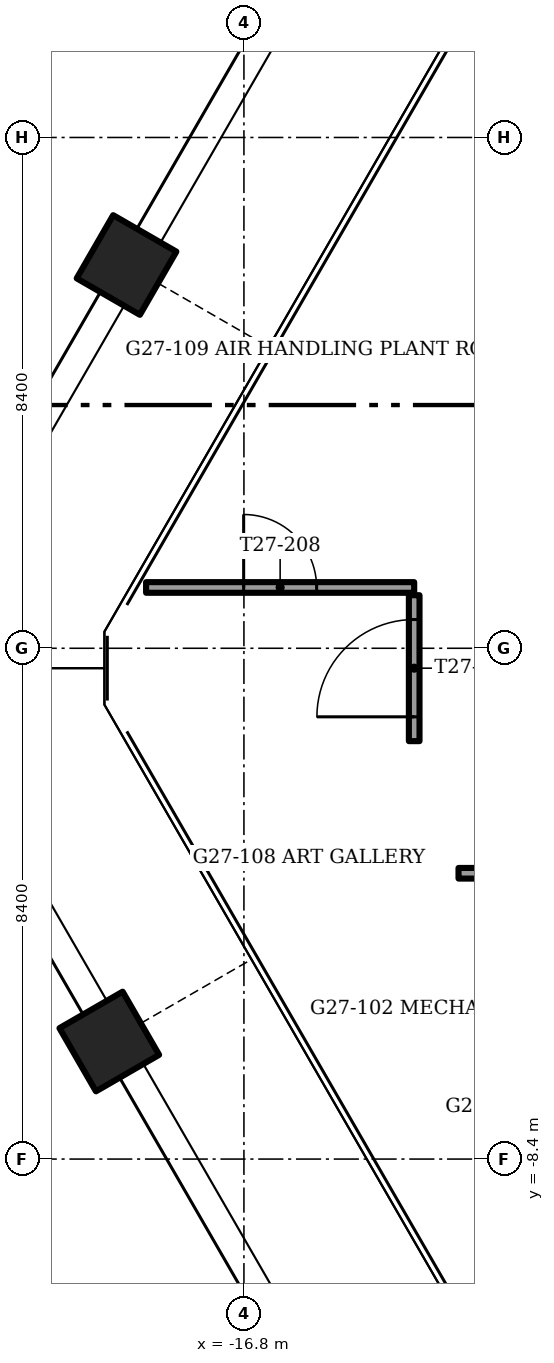
"""IFC4 building model, lengths in metres.
Left out: names, types, materials, properties, quantities, classifications, styles, units other than length and angle.
Written with IfcOpenShell. Run it as: python <this file> out.ifc"""

import sys

from ifc_helpers import new_model, si_unit, direction, frame, frame_2d, origin, origin_2d, place, context, subcontext, project, spatial, rectangle, extrude, element, fill, save


model = new_model("IFC4")
c1 = context("Model", 3, precision=1e-05, world=origin(), true_north=direction((0.0, 1.0)))
c2 = subcontext(c1, "Body", "Model", "MODEL_VIEW")
j1 = project(units=[si_unit("LENGTHUNIT", "METRE"), si_unit("PLANEANGLEUNIT", "RADIAN")], contexts=[c1])
p1 = place(None, origin())
s1 = spatial("IfcSite", under=j1, at=p1, CompositionType="ELEMENT")
p2 = place(p1, origin())
s2 = spatial("IfcBuilding", under=s1, at=p2, CompositionType="ELEMENT")
p3 = place(p2, frame((0.0, 0.0, 108.0)))
s3 = spatial("IfcBuildingStorey", under=s2, at=p3, CompositionType="ELEMENT", Elevation=108.0)
for number, where, z_axis, x_axis in (
    (1, (-18.731, 6.303, -1.2), (0.0, 0.0, 1.0), (0.5, 0.866, 0.0)),
    (2, (-19.014, -6.467, -1.2), (0.0, 0.0, 1.0), (-0.5, 0.866, 0.0)),
):
    element("IfcColumn", number, at=place(p3, frame(where, z_axis=z_axis, x_axis=x_axis)), inside=s3, PredefinedType="COLUMN", context=c2, shape_type="SweptSolid", body=[
        extrude(rectangle(XDim=1.2, YDim=1.2, at=origin_2d()), origin(), (0.0, 0.0, 1.0), 8.0),
    ])
p4 = place(p3, frame((-13.271, -3.7, 0.0), z_axis=(0.0, 0.0, 1.0), x_axis=(1.0, 0.0, 0.0)))
e3 = element("IfcWall", 3, at=p4, inside=s3, PredefinedType="PARTITIONING", context=c2, shape_type="SweptSolid", body=[
    extrude(rectangle(XDim=3.891, YDim=0.175, at=frame_2d((1.946, 0.0))), origin(), (0.0, 0.0, 1.0), 7.7),
])
p5 = place(p4, frame((1.346, 0.0, 0.0)))
e4 = element("IfcOpeningElement", 4, at=p5, cuts=e3, PredefinedType="OPENING", context=c2, shape_type="SweptSolid", body=[
    extrude(rectangle(XDim=1.2, YDim=2.1, at=frame_2d((0.6, 1.05))), frame((0.0, 0.087, 0.0), z_axis=(0.0, -1.0, 0.0), x_axis=(1.0, 0.0, 0.0)), (0.0, 0.0, 1.0), 0.175),
])
p6 = place(p3, frame((-18.409, 1.0, 0.0), z_axis=(0.0, 0.0, 1.0), x_axis=(1.0, 0.0, 0.0)))
e5 = element("IfcWall", 5, at=p6, inside=s3, PredefinedType="PARTITIONING", context=c2, shape_type="SweptSolid", body=[
    extrude(rectangle(XDim=4.409, YDim=0.175, at=frame_2d((2.205, 0.0))), origin(), (0.0, 0.0, 1.0), 7.7),
])
p7 = place(p6, frame((1.604, 0.0, 0.0)))
e6 = element("IfcOpeningElement", 6, at=p7, cuts=e5, PredefinedType="OPENING", context=c2, shape_type="SweptSolid", body=[
    extrude(rectangle(XDim=1.2, YDim=2.1, at=frame_2d((0.6, 1.05))), frame((0.0, 0.087, 0.0), z_axis=(0.0, -1.0, 0.0), x_axis=(1.0, 0.0, 0.0)), (0.0, 0.0, 1.0), 0.175),
])
p8 = place(p3, frame((-14.0, -1.527, 0.0), z_axis=(0.0, 0.0, 1.0), x_axis=(0.0, 1.0, 0.0)))
e7 = element("IfcWall", 7, at=p8, inside=s3, PredefinedType="PARTITIONING", context=c2, shape_type="SweptSolid", body=[
    extrude(rectangle(XDim=2.4, YDim=0.175, at=frame_2d((1.2, 0.0))), origin(), (0.0, 0.0, 1.0), 7.7),
])
p9 = place(p8, frame((0.4, 0.0, 0.0)))
e8 = element("IfcOpeningElement", 8, at=p9, cuts=e7, PredefinedType="OPENING", context=c2, shape_type="SweptSolid", body=[
    extrude(rectangle(XDim=1.6, YDim=2.1, at=frame_2d((0.8, 1.05))), frame((0.0, 0.087, 0.0), z_axis=(0.0, -1.0, 0.0), x_axis=(1.0, 0.0, 0.0)), (0.0, 0.0, 1.0), 0.175),
])
p10 = place(p9, origin())
e9 = element("IfcDoor", 9, at=p10, inside=s3, OperationType="DOUBLE_DOOR_SINGLE_SWING", PredefinedType="DOOR", context=c2, shape_type="SweptSolid", body=[
    extrude(rectangle(XDim=1.6, YDim=2.1, at=frame_2d((0.8, 1.05))), frame((0.0, 0.025, 0.0), z_axis=(0.0, -1.0, 0.0), x_axis=(1.0, 0.0, 0.0)), (0.0, 0.0, 1.0), 0.05),
])
fill(e8, e9)
p11 = place(p7, origin())
e10 = element("IfcDoor", 10, at=p11, inside=s3, OperationType="SINGLE_SWING_RIGHT", PredefinedType="DOOR", context=c2, shape_type="SweptSolid", body=[
    extrude(rectangle(XDim=1.2, YDim=2.1, at=frame_2d((0.6, 1.05))), frame((0.0, 0.025, 0.0), z_axis=(0.0, -1.0, 0.0), x_axis=(1.0, 0.0, 0.0)), (0.0, 0.0, 1.0), 0.05),
])
fill(e6, e10)
save(model, sys.argv[1])
